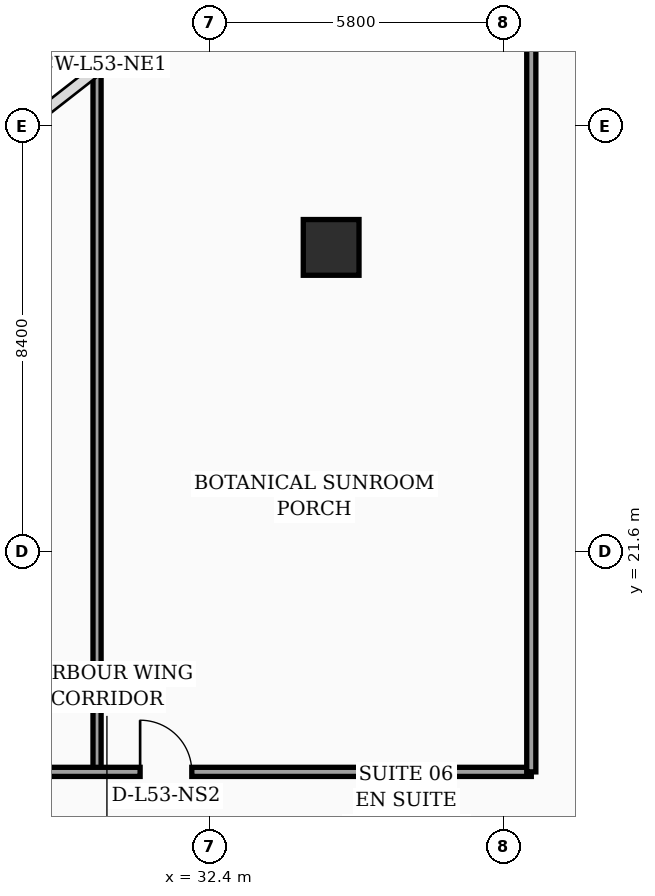
"""IFC4 building model, lengths in metres.
Left out: names, types, materials, properties, quantities, classifications, styles, units other than length and angle.
Written with IfcOpenShell. Run it as: python <this file> out.ifc"""

import sys

from ifc_helpers import new_model, si_unit, direction, frame, frame_2d, origin, origin_2d, place, context, subcontext, project, spatial, rectangle, circle, extrude, element, fill, save


model = new_model("IFC4")
c1 = context("Model", 3, precision=1e-05, world=origin(), true_north=direction((0.0, 1.0)))
c2 = subcontext(c1, "Body", "Model", "MODEL_VIEW")
j1 = project(units=[si_unit("LENGTHUNIT", "METRE"), si_unit("PLANEANGLEUNIT", "RADIAN")], contexts=[c1])
p1 = place(None, origin())
s1 = spatial("IfcSite", under=j1, at=p1, CompositionType="ELEMENT")
p2 = place(p1, origin())
s2 = spatial("IfcBuilding", under=s1, at=p2, CompositionType="ELEMENT")
p3 = place(p2, frame((0.0, 0.0, 214.8)))
s3 = spatial("IfcBuildingStorey", under=s2, at=p3, CompositionType="ELEMENT", Elevation=214.8)
p4 = place(p3, frame((34.8, 27.6, 0.0), z_axis=(0.0, 0.0, 1.0), x_axis=(1.0, 0.0, 0.0)))
e1 = element("IfcColumn", 1, at=p4, inside=s3, PredefinedType="COLUMN", context=c2, shape_type="SweptSolid", body=[
    extrude(circle(Radius=0.55, at=origin_2d()), origin(), (0.0, 0.0, 1.0), 4.05),
])
p5 = place(p3, frame((30.18, 17.25, 0.0), z_axis=(0.0, 0.0, 1.0), x_axis=(0.0, 1.0, 0.0)))
e2 = element("IfcWall", 2, at=p5, inside=s3, PredefinedType="PARTITIONING", context=c2, shape_type="SweptSolid", body=[
    extrude(rectangle(XDim=13.94, YDim=0.16, at=frame_2d((6.97, 0.0))), origin(), (0.0, 0.0, 1.0), 2.35),
])
p6 = place(p3, frame((21.5, 17.25, 0.0), z_axis=(0.0, 0.0, 1.0), x_axis=(1.0, 0.0, 0.0)))
e3 = element("IfcWall", 3, at=p6, inside=s3, PredefinedType="PARTITIONING", context=c2, shape_type="SweptSolid", body=[
    extrude(rectangle(XDim=17.25, YDim=0.18, at=frame_2d((8.625, 0.0))), origin(), (0.0, 0.0, 1.0), 2.35),
])
p7 = place(p6, frame((0.95, 0.0, 0.0)))
e4 = element("IfcOpeningElement", 4, at=p7, cuts=e3, PredefinedType="OPENING", context=c2, shape_type="SweptSolid", body=[
    extrude(rectangle(XDim=1.02, YDim=2.2, at=frame_2d((0.51, 1.1))), frame((0.0, 0.1, 0.0), z_axis=(0.0, -1.0, 0.0), x_axis=(1.0, 0.0, 0.0)), (0.0, 0.0, 1.0), 0.2),
])
p8 = place(p6, frame((9.53, 0.0, 0.0)))
e5 = element("IfcOpeningElement", 5, at=p8, cuts=e3, PredefinedType="OPENING", context=c2, shape_type="SweptSolid", body=[
    extrude(rectangle(XDim=1.02, YDim=2.2, at=frame_2d((0.51, 1.1))), frame((0.0, 0.1, 0.0), z_axis=(0.0, -1.0, 0.0), x_axis=(1.0, 0.0, 0.0)), (0.0, 0.0, 1.0), 0.2),
])
p9 = place(p3, frame((38.75, 17.25, 0.0), z_axis=(0.0, 0.0, 1.0), x_axis=(0.0, 1.0, 0.0)))
e6 = element("IfcWall", 6, at=p9, inside=s3, PredefinedType="PARTITIONING", context=c2, shape_type="SweptSolid", body=[
    extrude(rectangle(XDim=20.63, YDim=0.18, at=frame_2d((10.315, 0.0))), origin(), (0.0, 0.0, 1.0), 2.35),
])
p10 = place(p8, origin())
e7 = element("IfcDoor", 7, at=p10, inside=s3, OperationType="SINGLE_SWING_LEFT", PredefinedType="DOOR", context=c2, shape_type="SweptSolid", body=[
    extrude(rectangle(XDim=1.02, YDim=2.2, at=frame_2d((0.51, 1.1))), frame((0.0, 0.025, 0.0), z_axis=(0.0, -1.0, 0.0), x_axis=(1.0, 0.0, 0.0)), (0.0, 0.0, 1.0), 0.05),
])
fill(e5, e7)
save(model, sys.argv[1])
